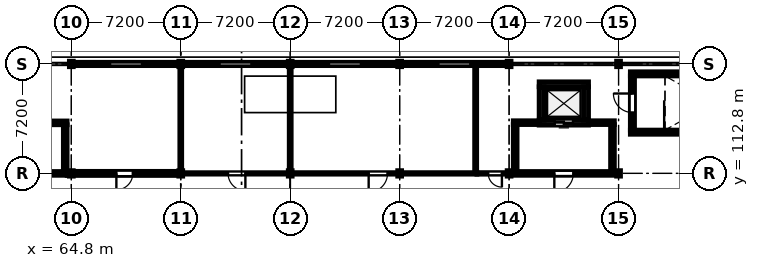
"""IFC4 building model, lengths in metres.
Left out: names, types, materials, properties, quantities, classifications, styles, units other than length and angle.
Written with IfcOpenShell. Run it as: python <this file> out.ifc"""

import sys

from ifc_helpers import new_model, si_unit, direction, frame, frame_2d, origin, origin_2d, place, context, subcontext, project, spatial, rectangle, i_section, extrude, element, fill, save


model = new_model("IFC4")
c1 = context("Model", 3, precision=1e-05, world=origin(), true_north=direction((0.0, 1.0)))
c2 = subcontext(c1, "Body", "Model", "MODEL_VIEW")
j1 = project(units=[si_unit("LENGTHUNIT", "METRE"), si_unit("PLANEANGLEUNIT", "RADIAN")], contexts=[c1])
p1 = place(None, origin())
s1 = spatial("IfcSite", under=j1, at=p1, CompositionType="ELEMENT")
p2 = place(p1, origin())
s2 = spatial("IfcBuilding", under=s1, at=p2, CompositionType="ELEMENT")
p3 = place(p2, frame((0.0, 0.0, 21.0)))
s3 = spatial("IfcBuildingStorey", under=s2, at=p3, CompositionType="ELEMENT", Elevation=21.0)
p4 = place(p3, frame((64.8, 112.8, 0.0), z_axis=(0.0, 0.0, 1.0), x_axis=(1.0, 0.0, 0.0)))
e1 = element("IfcColumn", 1, at=p4, inside=s3, PredefinedType="COLUMN", context=c2, shape_type="SweptSolid", body=[
    extrude(i_section(OverallWidth=0.257, OverallDepth=0.363, WebThickness=0.013, FlangeThickness=0.022, FilletRadius=0.015, at=origin_2d()), origin(), (0.0, 0.0, 1.0), 3.3),
])
p5 = place(p3, frame((64.8, 120.0, 0.0), z_axis=(0.0, 0.0, 1.0), x_axis=(1.0, 0.0, 0.0)))
e2 = element("IfcColumn", 2, at=p5, inside=s3, PredefinedType="COLUMN", context=c2, shape_type="SweptSolid", body=[
    extrude(i_section(OverallWidth=0.257, OverallDepth=0.363, WebThickness=0.013, FlangeThickness=0.022, FilletRadius=0.015, at=origin_2d()), origin(), (0.0, 0.0, 1.0), 4.8),
])
p6 = place(p3, frame((72.0, 112.8, 0.0), z_axis=(0.0, 0.0, 1.0), x_axis=(1.0, 0.0, 0.0)))
e3 = element("IfcColumn", 3, at=p6, inside=s3, PredefinedType="COLUMN", context=c2, shape_type="SweptSolid", body=[
    extrude(i_section(OverallWidth=0.257, OverallDepth=0.363, WebThickness=0.013, FlangeThickness=0.022, FilletRadius=0.015, at=origin_2d()), origin(), (0.0, 0.0, 1.0), 3.3),
])
p7 = place(p3, frame((72.0, 120.0, 0.0), z_axis=(0.0, 0.0, 1.0), x_axis=(1.0, 0.0, 0.0)))
e4 = element("IfcColumn", 4, at=p7, inside=s3, PredefinedType="COLUMN", context=c2, shape_type="SweptSolid", body=[
    extrude(i_section(OverallWidth=0.257, OverallDepth=0.363, WebThickness=0.013, FlangeThickness=0.022, FilletRadius=0.015, at=origin_2d()), origin(), (0.0, 0.0, 1.0), 4.8),
])
p8 = place(p3, frame((79.2, 112.8, 0.0), z_axis=(0.0, 0.0, 1.0), x_axis=(1.0, 0.0, 0.0)))
e5 = element("IfcColumn", 5, at=p8, inside=s3, PredefinedType="COLUMN", context=c2, shape_type="SweptSolid", body=[
    extrude(i_section(OverallWidth=0.257, OverallDepth=0.363, WebThickness=0.013, FlangeThickness=0.022, FilletRadius=0.015, at=origin_2d()), origin(), (0.0, 0.0, 1.0), 3.3),
])
p9 = place(p3, frame((79.2, 120.0, 0.0), z_axis=(0.0, 0.0, 1.0), x_axis=(1.0, 0.0, 0.0)))
e6 = element("IfcColumn", 6, at=p9, inside=s3, PredefinedType="COLUMN", context=c2, shape_type="SweptSolid", body=[
    extrude(i_section(OverallWidth=0.257, OverallDepth=0.363, WebThickness=0.013, FlangeThickness=0.022, FilletRadius=0.015, at=origin_2d()), origin(), (0.0, 0.0, 1.0), 4.8),
])
p10 = place(p3, frame((86.4, 112.8, 0.0), z_axis=(0.0, 0.0, 1.0), x_axis=(1.0, 0.0, 0.0)))
e7 = element("IfcColumn", 7, at=p10, inside=s3, PredefinedType="COLUMN", context=c2, shape_type="SweptSolid", body=[
    extrude(i_section(OverallWidth=0.257, OverallDepth=0.363, WebThickness=0.013, FlangeThickness=0.022, FilletRadius=0.015, at=origin_2d()), origin(), (0.0, 0.0, 1.0), 3.3),
])
p11 = place(p3, frame((86.4, 120.0, 0.0), z_axis=(0.0, 0.0, 1.0), x_axis=(1.0, 0.0, 0.0)))
e8 = element("IfcColumn", 8, at=p11, inside=s3, PredefinedType="COLUMN", context=c2, shape_type="SweptSolid", body=[
    extrude(i_section(OverallWidth=0.257, OverallDepth=0.363, WebThickness=0.013, FlangeThickness=0.022, FilletRadius=0.015, at=origin_2d()), origin(), (0.0, 0.0, 1.0), 4.8),
])
p12 = place(p3, frame((93.6, 112.8, 0.0), z_axis=(0.0, 0.0, 1.0), x_axis=(1.0, 0.0, 0.0)))
e9 = element("IfcColumn", 9, at=p12, inside=s3, PredefinedType="COLUMN", context=c2, shape_type="SweptSolid", body=[
    extrude(i_section(OverallWidth=0.257, OverallDepth=0.363, WebThickness=0.013, FlangeThickness=0.022, FilletRadius=0.015, at=origin_2d()), origin(), (0.0, 0.0, 1.0), 3.3),
])
p13 = place(p3, frame((93.6, 120.0, 0.0), z_axis=(0.0, 0.0, 1.0), x_axis=(1.0, 0.0, 0.0)))
e10 = element("IfcColumn", 10, at=p13, inside=s3, PredefinedType="COLUMN", context=c2, shape_type="SweptSolid", body=[
    extrude(i_section(OverallWidth=0.257, OverallDepth=0.363, WebThickness=0.013, FlangeThickness=0.022, FilletRadius=0.015, at=origin_2d()), origin(), (0.0, 0.0, 1.0), 4.8),
])
p14 = place(p3, frame((100.8, 112.8, 0.0), z_axis=(0.0, 0.0, 1.0), x_axis=(1.0, 0.0, 0.0)))
e11 = element("IfcColumn", 11, at=p14, inside=s3, PredefinedType="COLUMN", context=c2, shape_type="SweptSolid", body=[
    extrude(i_section(OverallWidth=0.257, OverallDepth=0.363, WebThickness=0.013, FlangeThickness=0.022, FilletRadius=0.015, at=origin_2d()), origin(), (0.0, 0.0, 1.0), 3.3),
])
p15 = place(p3, frame((100.8, 120.0, 0.0), z_axis=(0.0, 0.0, 1.0), x_axis=(1.0, 0.0, 0.0)))
e12 = element("IfcColumn", 12, at=p15, inside=s3, PredefinedType="COLUMN", context=c2, shape_type="SweptSolid", body=[
    extrude(i_section(OverallWidth=0.257, OverallDepth=0.363, WebThickness=0.013, FlangeThickness=0.022, FilletRadius=0.015, at=origin_2d()), origin(), (0.0, 0.0, 1.0), 4.8),
])
p16 = place(p3, frame((64.936, 120.0, 0.0), z_axis=(0.0, 0.0, 1.0), x_axis=(1.0, 0.0, 0.0)))
e13 = element("IfcWall", 13, at=p16, inside=s3, PredefinedType="STANDARD", context=c2, shape_type="SweptSolid", body=[
    extrude(rectangle(XDim=6.928, YDim=0.22, at=frame_2d((3.464, 0.0))), origin(), (0.0, 0.0, 1.0), 4.3),
])
p17 = place(p16, frame((2.414, 0.0, 1.2)))
e14 = element("IfcOpeningElement", 14, at=p17, cuts=e13, PredefinedType="OPENING", context=c2, shape_type="SweptSolid", body=[
    extrude(rectangle(XDim=2.1, YDim=1.5, at=frame_2d((1.05, 0.75))), frame((0.0, 0.12, 0.0), z_axis=(0.0, -1.0, 0.0), x_axis=(1.0, 0.0, 0.0)), (0.0, 0.0, 1.0), 0.24),
])
p18 = place(p3, frame((72.136, 120.0, 0.0), z_axis=(0.0, 0.0, 1.0), x_axis=(1.0, 0.0, 0.0)))
e15 = element("IfcWall", 15, at=p18, inside=s3, PredefinedType="STANDARD", context=c2, shape_type="SweptSolid", body=[
    extrude(rectangle(XDim=6.928, YDim=0.22, at=frame_2d((3.464, 0.0))), origin(), (0.0, 0.0, 1.0), 4.3),
])
p19 = place(p18, frame((2.414, 0.0, 1.2)))
e16 = element("IfcOpeningElement", 16, at=p19, cuts=e15, PredefinedType="OPENING", context=c2, shape_type="SweptSolid", body=[
    extrude(rectangle(XDim=2.1, YDim=1.5, at=frame_2d((1.05, 0.75))), frame((0.0, 0.12, 0.0), z_axis=(0.0, -1.0, 0.0), x_axis=(1.0, 0.0, 0.0)), (0.0, 0.0, 1.0), 0.24),
])
p20 = place(p3, frame((79.336, 120.0, 0.0), z_axis=(0.0, 0.0, 1.0), x_axis=(1.0, 0.0, 0.0)))
e17 = element("IfcWall", 17, at=p20, inside=s3, PredefinedType="STANDARD", context=c2, shape_type="SweptSolid", body=[
    extrude(rectangle(XDim=6.928, YDim=0.22, at=frame_2d((3.464, 0.0))), origin(), (0.0, 0.0, 1.0), 4.3),
])
p21 = place(p20, frame((2.414, 0.0, 1.2)))
e18 = element("IfcOpeningElement", 18, at=p21, cuts=e17, PredefinedType="OPENING", context=c2, shape_type="SweptSolid", body=[
    extrude(rectangle(XDim=2.1, YDim=1.5, at=frame_2d((1.05, 0.75))), frame((0.0, 0.12, 0.0), z_axis=(0.0, -1.0, 0.0), x_axis=(1.0, 0.0, 0.0)), (0.0, 0.0, 1.0), 0.24),
])
p22 = place(p3, frame((86.536, 120.0, 0.0), z_axis=(0.0, 0.0, 1.0), x_axis=(1.0, 0.0, 0.0)))
e19 = element("IfcWall", 19, at=p22, inside=s3, PredefinedType="STANDARD", context=c2, shape_type="SweptSolid", body=[
    extrude(rectangle(XDim=6.928, YDim=0.22, at=frame_2d((3.464, 0.0))), origin(), (0.0, 0.0, 1.0), 4.3),
])
p23 = place(p22, frame((2.414, 0.0, 1.2)))
e20 = element("IfcOpeningElement", 20, at=p23, cuts=e19, PredefinedType="OPENING", context=c2, shape_type="SweptSolid", body=[
    extrude(rectangle(XDim=2.1, YDim=1.5, at=frame_2d((1.05, 0.75))), frame((0.0, 0.12, 0.0), z_axis=(0.0, -1.0, 0.0), x_axis=(1.0, 0.0, 0.0)), (0.0, 0.0, 1.0), 0.24),
])
for number, where, z_axis, x_axis in (
    (21, (110.475, 115.512, 0.0), (0.0, 0.0, 1.0), (-1.0, 0.0, 0.0)),
    (22, (101.575, 119.348, 0.0), (0.0, 0.0, 1.0), (1.0, 0.0, 0.0)),
):
    element("IfcWall", number, at=place(p3, frame(where, z_axis=z_axis, x_axis=x_axis)), inside=s3, PredefinedType="SOLIDWALL", context=c2, shape_type="SweptSolid", body=[
        extrude(rectangle(XDim=8.9, YDim=0.275, at=frame_2d((4.45, 0.0))), origin(), (0.0, 0.0, 1.0), 2.6),
    ])
p24 = place(p3, frame((101.712, 115.65, 0.0), z_axis=(0.0, 0.0, 1.0), x_axis=(0.0, 1.0, 0.0)))
e23 = element("IfcWall", 23, at=p24, inside=s3, PredefinedType="SOLIDWALL", context=c2, shape_type="SweptSolid", body=[
    extrude(rectangle(XDim=3.56, YDim=0.275, at=frame_2d((1.78, 0.0))), origin(), (0.0, 0.0, 1.0), 2.6),
])
p25 = place(p24, frame((1.155, 0.0, 0.0)))
e24 = element("IfcOpeningElement", 24, at=p25, cuts=e23, PredefinedType="OPENING", context=c2, shape_type="SweptSolid", body=[
    extrude(rectangle(XDim=1.25, YDim=2.2, at=frame_2d((0.625, 1.1))), frame((0.0, 0.147, 0.0), z_axis=(0.0, -1.0, 0.0), x_axis=(1.0, 0.0, 0.0)), (0.0, 0.0, 1.0), 0.295),
])
p26 = place(p3, frame((98.825, 116.138, 0.0), z_axis=(0.0, 0.0, 1.0), x_axis=(-1.0, 0.0, 0.0)))
e25 = element("IfcWall", 25, at=p26, inside=s3, PredefinedType="SHEAR", context=c2, shape_type="SweptSolid", body=[
    extrude(rectangle(XDim=3.25, YDim=0.325, at=frame_2d((1.625, 0.0))), origin(), (0.0, 0.0, 1.0), 2.6),
])
p27 = place(p26, frame((1.025, 0.0, 0.0)))
e26 = element("IfcOpeningElement", 26, at=p27, cuts=e25, PredefinedType="OPENING", context=c2, shape_type="SweptSolid", body=[
    extrude(rectangle(XDim=1.2, YDim=2.2, at=frame_2d((0.6, 1.1))), frame((0.0, 0.172, 0.0), z_axis=(0.0, -1.0, 0.0), x_axis=(1.0, 0.0, 0.0)), (0.0, 0.0, 1.0), 0.345),
])
p28 = place(p3, frame((95.575, 118.662, 0.0), z_axis=(0.0, 0.0, 1.0), x_axis=(1.0, 0.0, 0.0)))
e27 = element("IfcWall", 27, at=p28, inside=s3, PredefinedType="SHEAR", context=c2, shape_type="SweptSolid", body=[
    extrude(rectangle(XDim=3.25, YDim=0.325, at=frame_2d((1.625, 0.0))), origin(), (0.0, 0.0, 1.0), 2.6),
])
for number, where, z_axis, x_axis in (
    (28, (95.738, 116.3, 0.0), (0.0, 0.0, 1.0), (0.0, 1.0, 0.0)),
    (29, (98.662, 118.5, 0.0), (0.0, 0.0, 1.0), (0.0, -1.0, 0.0)),
):
    element("IfcWall", number, at=place(p3, frame(where, z_axis=z_axis, x_axis=x_axis)), inside=s3, PredefinedType="SHEAR", context=c2, shape_type="SweptSolid", body=[
        extrude(rectangle(XDim=2.2, YDim=0.325, at=frame_2d((1.1, 0.0))), origin(), (0.0, 0.0, 1.0), 2.6),
    ])
p29 = place(p3, frame((64.525, 112.8, 0.0), z_axis=(0.0, 0.0, 1.0), x_axis=(-1.0, 0.0, 0.0)))
e30 = element("IfcWall", 30, at=p29, inside=s3, PredefinedType="PARTITIONING", context=c2, shape_type="SweptSolid", body=[
    extrude(rectangle(XDim=6.65, YDim=0.25, at=frame_2d((3.325, 0.0))), origin(), (0.0, 0.0, 1.0), 2.5),
])
p30 = place(p29, frame((2.7, 0.0, 0.0)))
e31 = element("IfcOpeningElement", 31, at=p30, cuts=e30, PredefinedType="OPENING", context=c2, shape_type="SweptSolid", body=[
    extrude(rectangle(XDim=1.25, YDim=2.2, at=frame_2d((0.625, 1.1))), frame((0.0, 0.135, 0.0), z_axis=(0.0, -1.0, 0.0), x_axis=(1.0, 0.0, 0.0)), (0.0, 0.0, 1.0), 0.27),
])
p31 = place(p3, frame((62.852, 116.125, 0.0), z_axis=(0.0, 0.0, 1.0), x_axis=(1.0, 0.0, 0.0)))
e32 = element("IfcWall", 32, at=p31, inside=s3, PredefinedType="PARTITIONING", context=c2, shape_type="SweptSolid", body=[
    extrude(rectangle(XDim=1.673, YDim=0.25, at=frame_2d((0.836, 0.0))), origin(), (0.0, 0.0, 1.0), 2.5),
])
p32 = place(p3, frame((64.4, 115.998, 0.0), z_axis=(0.0, 0.0, 1.0), x_axis=(0.0, -1.0, 0.0)))
e33 = element("IfcWall", 33, at=p32, inside=s3, PredefinedType="PARTITIONING", context=c2, shape_type="SweptSolid", body=[
    extrude(rectangle(XDim=3.071, YDim=0.25, at=frame_2d((1.536, 0.0))), origin(), (0.0, 0.0, 1.0), 2.5),
])
p33 = place(p3, frame((100.525, 112.8, 0.0), z_axis=(0.0, 0.0, 1.0), x_axis=(-1.0, 0.0, 0.0)))
e34 = element("IfcWall", 34, at=p33, inside=s3, PredefinedType="PARTITIONING", context=c2, shape_type="SweptSolid", body=[
    extrude(rectangle(XDim=6.65, YDim=0.25, at=frame_2d((3.325, 0.0))), origin(), (0.0, 0.0, 1.0), 2.5),
])
p34 = place(p33, frame((2.7, 0.0, 0.0)))
e35 = element("IfcOpeningElement", 35, at=p34, cuts=e34, PredefinedType="OPENING", context=c2, shape_type="SweptSolid", body=[
    extrude(rectangle(XDim=1.25, YDim=2.2, at=frame_2d((0.625, 1.1))), frame((0.0, 0.135, 0.0), z_axis=(0.0, -1.0, 0.0), x_axis=(1.0, 0.0, 0.0)), (0.0, 0.0, 1.0), 0.27),
])
for number, where, z_axis, x_axis in (
    (36, (93.875, 116.138, 0.0), (0.0, 0.0, 1.0), (1.0, 0.0, 0.0)),
    (37, (98.827, 116.138, 0.0), (0.0, 0.0, 1.0), (1.0, 0.0, 0.0)),
):
    element("IfcWall", number, at=place(p3, frame(where, z_axis=z_axis, x_axis=x_axis)), inside=s3, PredefinedType="PARTITIONING", context=c2, shape_type="SweptSolid", body=[
        extrude(rectangle(XDim=1.698, YDim=0.25, at=frame_2d((0.849, 0.0))), origin(), (0.0, 0.0, 1.0), 2.5),
    ])
for number, where, z_axis, x_axis in (
    (38, (94.0, 112.927, 0.0), (0.0, 0.0, 1.0), (0.0, 1.0, 0.0)),
    (39, (100.4, 116.011, 0.0), (0.0, 0.0, 1.0), (0.0, -1.0, 0.0)),
):
    element("IfcWall", number, at=place(p3, frame(where, z_axis=z_axis, x_axis=x_axis)), inside=s3, PredefinedType="PARTITIONING", context=c2, shape_type="SweptSolid", body=[
        extrude(rectangle(XDim=3.084, YDim=0.25, at=frame_2d((1.542, 0.0))), origin(), (0.0, 0.0, 1.0), 2.5),
    ])
p35 = place(p3, frame((72.08, 112.8, 0.0), z_axis=(0.0, 0.0, 1.0), x_axis=(-1.0, 0.0, 0.0)))
e40 = element("IfcWall", 40, at=p35, inside=s3, PredefinedType="PARTITIONING", context=c2, shape_type="SweptSolid", body=[
    extrude(rectangle(XDim=7.553, YDim=0.27, at=frame_2d((3.776, 0.0))), origin(), (0.0, 0.0, 1.0), 2.5),
])
p36 = place(p35, frame((3.236, 0.0, 0.0)))
e41 = element("IfcOpeningElement", 41, at=p36, cuts=e40, PredefinedType="OPENING", context=c2, shape_type="SweptSolid", body=[
    extrude(rectangle(XDim=1.08, YDim=2.16, at=frame_2d((0.54, 1.08))), frame((0.0, 0.145, 0.0), z_axis=(0.0, -1.0, 0.0), x_axis=(1.0, 0.0, 0.0)), (0.0, 0.0, 1.0), 0.29),
])
p37 = place(p3, frame((79.28, 112.8, 0.0), z_axis=(0.0, 0.0, 1.0), x_axis=(-1.0, 0.0, 0.0)))
e42 = element("IfcWall", 42, at=p37, inside=s3, PredefinedType="PARTITIONING", context=c2, shape_type="SweptSolid", body=[
    extrude(rectangle(XDim=7.198, YDim=0.095, at=frame_2d((3.599, 0.0))), origin(), (0.0, 0.0, 1.0), 2.5),
])
p38 = place(p37, frame((3.029, 0.0, 0.0)))
e43 = element("IfcOpeningElement", 43, at=p38, cuts=e42, PredefinedType="OPENING", context=c2, shape_type="SweptSolid", body=[
    extrude(rectangle(XDim=1.14, YDim=2.16, at=frame_2d((0.57, 1.08))), frame((0.0, 0.057, 0.0), z_axis=(0.0, -1.0, 0.0), x_axis=(1.0, 0.0, 0.0)), (0.0, 0.0, 1.0), 0.115),
])
p39 = place(p3, frame((91.48, 112.8, 0.0), z_axis=(0.0, 0.0, 1.0), x_axis=(-1.0, 0.0, 0.0)))
e44 = element("IfcWall", 44, at=p39, inside=s3, PredefinedType="PARTITIONING", context=c2, shape_type="SweptSolid", body=[
    extrude(rectangle(XDim=12.198, YDim=0.1, at=frame_2d((6.099, 0.0))), origin(), (0.0, 0.0, 1.0), 2.5),
])
p40 = place(p39, frame((5.879, 0.0, 0.0)))
e45 = element("IfcOpeningElement", 45, at=p40, cuts=e44, PredefinedType="OPENING", context=c2, shape_type="SweptSolid", body=[
    extrude(rectangle(XDim=1.24, YDim=2.16, at=frame_2d((0.62, 1.08))), frame((0.0, 0.06, 0.0), z_axis=(0.0, -1.0, 0.0), x_axis=(1.0, 0.0, 0.0)), (0.0, 0.0, 1.0), 0.12),
])
p41 = place(p39, frame((8.369, 0.0, 0.95)))
e46 = element("IfcOpeningElement", 46, at=p41, cuts=e44, PredefinedType="OPENING", context=c2, shape_type="SweptSolid", body=[
    extrude(rectangle(XDim=1.75, YDim=1.15, at=frame_2d((0.875, 0.575))), frame((0.0, 0.06, 0.0), z_axis=(0.0, -1.0, 0.0), x_axis=(1.0, 0.0, 0.0)), (0.0, 0.0, 1.0), 0.12),
])
p42 = place(p3, frame((93.873, 112.8, 0.0), z_axis=(0.0, 0.0, 1.0), x_axis=(-1.0, 0.0, 0.0)))
e47 = element("IfcWall", 47, at=p42, inside=s3, PredefinedType="PARTITIONING", context=c2, shape_type="SweptSolid", body=[
    extrude(rectangle(XDim=2.391, YDim=0.105, at=frame_2d((1.196, 0.0))), origin(), (0.0, 0.0, 1.0), 2.5),
])
p43 = place(p42, frame((0.746, 0.0, 0.0)))
e48 = element("IfcOpeningElement", 48, at=p43, cuts=e47, PredefinedType="OPENING", context=c2, shape_type="SweptSolid", body=[
    extrude(rectangle(XDim=0.9, YDim=2.1, at=frame_2d((0.45, 1.05))), frame((0.0, 0.062, 0.0), z_axis=(0.0, -1.0, 0.0), x_axis=(1.0, 0.0, 0.0)), (0.0, 0.0, 1.0), 0.125),
])
p44 = place(p3, frame((72.0, 119.858, 0.0), z_axis=(0.0, 0.0, 1.0), x_axis=(0.0, -1.0, 0.0)))
e49 = element("IfcWall", 49, at=p44, inside=s3, PredefinedType="PARTITIONING", context=c2, shape_type="SweptSolid", body=[
    extrude(rectangle(XDim=6.921, YDim=0.125, at=frame_2d((3.46, 0.0))), origin(), (0.0, 0.0, 1.0), 2.5),
])
p45 = place(p3, frame((79.2, 119.858, 0.0), z_axis=(0.0, 0.0, 1.0), x_axis=(0.0, -1.0, 0.0)))
e50 = element("IfcWall", 50, at=p45, inside=s3, PredefinedType="PARTITIONING", context=c2, shape_type="SweptSolid", body=[
    extrude(rectangle(XDim=7.006, YDim=0.13, at=frame_2d((3.503, 0.0))), origin(), (0.0, 0.0, 1.0), 2.5),
])
p46 = place(p3, frame((91.4, 119.858, 0.0), z_axis=(0.0, 0.0, 1.0), x_axis=(0.0, -1.0, 0.0)))
e51 = element("IfcWall", 51, at=p46, inside=s3, PredefinedType="PARTITIONING", context=c2, shape_type="SweptSolid", body=[
    extrude(rectangle(XDim=7.004, YDim=0.135, at=frame_2d((3.502, 0.0))), origin(), (0.0, 0.0, 1.0), 2.5),
])
p47 = place(p17, origin())
e52 = element("IfcWindow", 52, at=p47, inside=s3, PartitioningType="SINGLE_PANEL", PredefinedType="WINDOW", context=c2, shape_type="SweptSolid", body=[
    extrude(rectangle(XDim=2.1, YDim=1.5, at=frame_2d((1.05, 0.75))), frame((0.0, 0.03, 0.0), z_axis=(0.0, -1.0, 0.0), x_axis=(1.0, 0.0, 0.0)), (0.0, 0.0, 1.0), 0.06),
])
fill(e14, e52)
p48 = place(p19, origin())
e53 = element("IfcWindow", 53, at=p48, inside=s3, PartitioningType="SINGLE_PANEL", PredefinedType="WINDOW", context=c2, shape_type="SweptSolid", body=[
    extrude(rectangle(XDim=2.1, YDim=1.5, at=frame_2d((1.05, 0.75))), frame((0.0, 0.03, 0.0), z_axis=(0.0, -1.0, 0.0), x_axis=(1.0, 0.0, 0.0)), (0.0, 0.0, 1.0), 0.06),
])
fill(e16, e53)
p49 = place(p21, origin())
e54 = element("IfcWindow", 54, at=p49, inside=s3, PartitioningType="SINGLE_PANEL", PredefinedType="WINDOW", context=c2, shape_type="SweptSolid", body=[
    extrude(rectangle(XDim=2.1, YDim=1.5, at=frame_2d((1.05, 0.75))), frame((0.0, 0.03, 0.0), z_axis=(0.0, -1.0, 0.0), x_axis=(1.0, 0.0, 0.0)), (0.0, 0.0, 1.0), 0.06),
])
fill(e18, e54)
p50 = place(p23, origin())
e55 = element("IfcWindow", 55, at=p50, inside=s3, PartitioningType="SINGLE_PANEL", PredefinedType="WINDOW", context=c2, shape_type="SweptSolid", body=[
    extrude(rectangle(XDim=2.1, YDim=1.5, at=frame_2d((1.05, 0.75))), frame((0.0, 0.03, 0.0), z_axis=(0.0, -1.0, 0.0), x_axis=(1.0, 0.0, 0.0)), (0.0, 0.0, 1.0), 0.06),
])
fill(e20, e55)
p51 = place(p25, origin())
e56 = element("IfcDoor", 56, at=p51, inside=s3, OperationType="SINGLE_SWING_RIGHT", PredefinedType="DOOR", context=c2, shape_type="SweptSolid", body=[
    extrude(rectangle(XDim=1.25, YDim=2.2, at=frame_2d((0.625, 1.1))), frame((0.0, 0.025, 0.0), z_axis=(0.0, -1.0, 0.0), x_axis=(1.0, 0.0, 0.0)), (0.0, 0.0, 1.0), 0.05),
])
fill(e24, e56)
p52 = place(p27, origin())
e57 = element("IfcDoor", 57, at=p52, inside=s3, OperationType="DOUBLE_DOOR_SLIDING", PredefinedType="DOOR", context=c2, shape_type="SweptSolid", body=[
    extrude(rectangle(XDim=1.2, YDim=2.2, at=frame_2d((0.6, 1.1))), frame((0.0, 0.025, 0.0), z_axis=(0.0, -1.0, 0.0), x_axis=(1.0, 0.0, 0.0)), (0.0, 0.0, 1.0), 0.05),
])
fill(e26, e57)
p53 = place(p34, origin())
e58 = element("IfcDoor", 58, at=p53, inside=s3, OperationType="SINGLE_SWING_RIGHT", PredefinedType="DOOR", context=c2, shape_type="SweptSolid", body=[
    extrude(rectangle(XDim=1.25, YDim=2.2, at=frame_2d((0.625, 1.1))), frame((0.0, 0.025, 0.0), z_axis=(0.0, -1.0, 0.0), x_axis=(1.0, 0.0, 0.0)), (0.0, 0.0, 1.0), 0.05),
])
fill(e35, e58)
p54 = place(p36, origin())
e59 = element("IfcDoor", 59, at=p54, inside=s3, OperationType="SINGLE_SWING_RIGHT", PredefinedType="DOOR", context=c2, shape_type="SweptSolid", body=[
    extrude(rectangle(XDim=1.08, YDim=2.16, at=frame_2d((0.54, 1.08))), frame((0.0, 0.025, 0.0), z_axis=(0.0, -1.0, 0.0), x_axis=(1.0, 0.0, 0.0)), (0.0, 0.0, 1.0), 0.05),
])
fill(e41, e59)
p55 = place(p38, origin())
e60 = element("IfcDoor", 60, at=p55, inside=s3, OperationType="SINGLE_SWING_LEFT", PredefinedType="DOOR", context=c2, shape_type="SweptSolid", body=[
    extrude(rectangle(XDim=1.14, YDim=2.16, at=frame_2d((0.57, 1.08))), frame((0.0, 0.025, 0.0), z_axis=(0.0, -1.0, 0.0), x_axis=(1.0, 0.0, 0.0)), (0.0, 0.0, 1.0), 0.05),
])
fill(e43, e60)
p56 = place(p40, origin())
e61 = element("IfcDoor", 61, at=p56, inside=s3, OperationType="SINGLE_SWING_RIGHT", PredefinedType="DOOR", context=c2, shape_type="SweptSolid", body=[
    extrude(rectangle(XDim=1.24, YDim=2.16, at=frame_2d((0.62, 1.08))), frame((0.0, 0.025, 0.0), z_axis=(0.0, -1.0, 0.0), x_axis=(1.0, 0.0, 0.0)), (0.0, 0.0, 1.0), 0.05),
])
fill(e45, e61)
p57 = place(p41, origin())
e62 = element("IfcWindow", 62, at=p57, inside=s3, PartitioningType="SINGLE_PANEL", PredefinedType="WINDOW", context=c2, shape_type="SweptSolid", body=[
    extrude(rectangle(XDim=1.75, YDim=1.15, at=frame_2d((0.875, 0.575))), frame((0.0, 0.03, 0.0), z_axis=(0.0, -1.0, 0.0), x_axis=(1.0, 0.0, 0.0)), (0.0, 0.0, 1.0), 0.06),
])
fill(e46, e62)
p58 = place(p43, origin())
e63 = element("IfcDoor", 63, at=p58, inside=s3, OperationType="SINGLE_SWING_LEFT", PredefinedType="DOOR", context=c2, shape_type="SweptSolid", body=[
    extrude(rectangle(XDim=0.9, YDim=2.1, at=frame_2d((0.45, 1.05))), frame((0.0, 0.025, 0.0), z_axis=(0.0, -1.0, 0.0), x_axis=(1.0, 0.0, 0.0)), (0.0, 0.0, 1.0), 0.05),
])
fill(e48, e63)
save(model, sys.argv[1])
